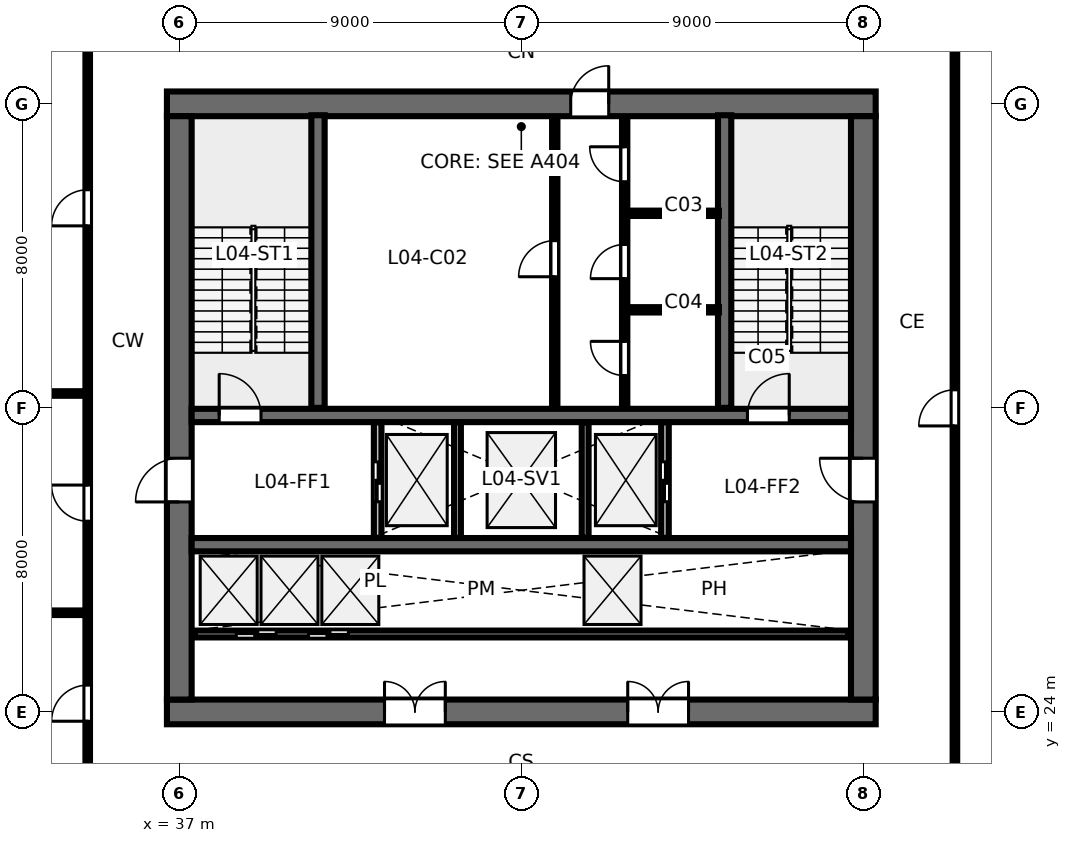
"""IFC4 building model, lengths in metres.
Left out: names, types, materials, properties, quantities, classifications, styles, units other than length and angle.
Written with IfcOpenShell. Run it as: python <this file> out.ifc"""

import sys

from ifc_helpers import new_model, si_unit, direction, frame, frame_2d, origin, place, context, subcontext, project, spatial, rectangle, extrude, element, fill, save


model = new_model("IFC4")
c1 = context("Model", 3, precision=1e-05, world=origin(), true_north=direction((0.0, 1.0)))
c2 = subcontext(c1, "Body", "Model", "MODEL_VIEW")
j1 = project(units=[si_unit("LENGTHUNIT", "METRE"), si_unit("PLANEANGLEUNIT", "RADIAN")], contexts=[c1])
p1 = place(None, origin())
s1 = spatial("IfcSite", under=j1, at=p1, CompositionType="ELEMENT")
p2 = place(p1, origin())
s2 = spatial("IfcBuilding", under=s1, at=p2, CompositionType="ELEMENT")
p3 = place(p2, frame((0.0, 0.0, 18.5)))
s3 = spatial("IfcBuildingStorey", under=s2, at=p3, CompositionType="ELEMENT", Elevation=18.5)
p4 = place(p3, frame((36.675, 24.0, 0.0), z_axis=(0.0, 0.0, 1.0), x_axis=(1.0, 0.0, 0.0)))
e1 = element("IfcWall", 1, at=p4, inside=s3, PredefinedType="SHEAR", context=c2, shape_type="SweptSolid", body=[
    extrude(rectangle(XDim=18.65, YDim=0.65, at=frame_2d((9.325, 0.0))), origin(), (0.0, 0.0, 1.0), 4.05),
])
p5 = place(p4, frame((5.725, 0.0, 0.0)))
e2 = element("IfcOpeningElement", 2, at=p5, cuts=e1, PredefinedType="OPENING", context=c2, shape_type="SweptSolid", body=[
    extrude(rectangle(XDim=1.6, YDim=2.15, at=frame_2d((0.8, 1.075))), frame((0.0, 0.335, 0.0), z_axis=(0.0, -1.0, 0.0), x_axis=(1.0, 0.0, 0.0)), (0.0, 0.0, 1.0), 0.67),
])
p6 = place(p4, frame((12.125, 0.0, 0.0)))
e3 = element("IfcOpeningElement", 3, at=p6, cuts=e1, PredefinedType="OPENING", context=c2, shape_type="SweptSolid", body=[
    extrude(rectangle(XDim=1.6, YDim=2.15, at=frame_2d((0.8, 1.075))), frame((0.0, 0.335, 0.0), z_axis=(0.0, -1.0, 0.0), x_axis=(1.0, 0.0, 0.0)), (0.0, 0.0, 1.0), 0.67),
])
p7 = place(p3, frame((36.675, 40.0, 0.0), z_axis=(0.0, 0.0, 1.0), x_axis=(1.0, 0.0, 0.0)))
e4 = element("IfcWall", 4, at=p7, inside=s3, PredefinedType="SHEAR", context=c2, shape_type="SweptSolid", body=[
    extrude(rectangle(XDim=18.65, YDim=0.65, at=frame_2d((9.325, 0.0))), origin(), (0.0, 0.0, 1.0), 4.05),
])
p8 = place(p7, frame((10.625, 0.0, 0.0)))
e5 = element("IfcOpeningElement", 5, at=p8, cuts=e4, PredefinedType="OPENING", context=c2, shape_type="SweptSolid", body=[
    extrude(rectangle(XDim=1.0, YDim=2.15, at=frame_2d((0.5, 1.075))), frame((0.0, 0.335, 0.0), z_axis=(0.0, -1.0, 0.0), x_axis=(1.0, 0.0, 0.0)), (0.0, 0.0, 1.0), 0.67),
])
p9 = place(p3, frame((37.0, 24.325, 0.0), z_axis=(0.0, 0.0, 1.0), x_axis=(0.0, 1.0, 0.0)))
e6 = element("IfcWall", 6, at=p9, inside=s3, PredefinedType="SHEAR", context=c2, shape_type="SweptSolid", body=[
    extrude(rectangle(XDim=15.35, YDim=0.65, at=frame_2d((7.675, 0.0))), origin(), (0.0, 0.0, 1.0), 4.05),
])
p10 = place(p9, frame((5.2, 0.0, 0.0)))
e7 = element("IfcOpeningElement", 7, at=p10, cuts=e6, PredefinedType="OPENING", context=c2, shape_type="SweptSolid", body=[
    extrude(rectangle(XDim=1.15, YDim=2.15, at=frame_2d((0.575, 1.075))), frame((0.0, 0.335, 0.0), z_axis=(0.0, -1.0, 0.0), x_axis=(1.0, 0.0, 0.0)), (0.0, 0.0, 1.0), 0.67),
])
p11 = place(p3, frame((55.0, 24.325, 0.0), z_axis=(0.0, 0.0, 1.0), x_axis=(0.0, 1.0, 0.0)))
e8 = element("IfcWall", 8, at=p11, inside=s3, PredefinedType="SHEAR", context=c2, shape_type="SweptSolid", body=[
    extrude(rectangle(XDim=15.35, YDim=0.65, at=frame_2d((7.675, 0.0))), origin(), (0.0, 0.0, 1.0), 4.05),
])
p12 = place(p11, frame((5.2, 0.0, 0.0)))
e9 = element("IfcOpeningElement", 9, at=p12, cuts=e8, PredefinedType="OPENING", context=c2, shape_type="SweptSolid", body=[
    extrude(rectangle(XDim=1.15, YDim=2.15, at=frame_2d((0.575, 1.075))), frame((0.0, 0.335, 0.0), z_axis=(0.0, -1.0, 0.0), x_axis=(1.0, 0.0, 0.0)), (0.0, 0.0, 1.0), 0.67),
])
p13 = place(p3, frame((37.325, 31.8, 0.0), z_axis=(0.0, 0.0, 1.0), x_axis=(1.0, 0.0, 0.0)))
e10 = element("IfcWall", 10, at=p13, inside=s3, PredefinedType="SHEAR", context=c2, shape_type="SweptSolid", body=[
    extrude(rectangle(XDim=17.35, YDim=0.35, at=frame_2d((8.675, 0.0))), origin(), (0.0, 0.0, 1.0), 4.05),
])
p14 = place(p13, frame((0.725, 0.0, 0.0)))
e11 = element("IfcOpeningElement", 11, at=p14, cuts=e10, PredefinedType="OPENING", context=c2, shape_type="SweptSolid", body=[
    extrude(rectangle(XDim=1.1, YDim=2.15, at=frame_2d((0.55, 1.075))), frame((0.0, 0.185, 0.0), z_axis=(0.0, -1.0, 0.0), x_axis=(1.0, 0.0, 0.0)), (0.0, 0.0, 1.0), 0.37),
])
p15 = place(p13, frame((14.625, 0.0, 0.0)))
e12 = element("IfcOpeningElement", 12, at=p15, cuts=e10, PredefinedType="OPENING", context=c2, shape_type="SweptSolid", body=[
    extrude(rectangle(XDim=1.1, YDim=2.15, at=frame_2d((0.55, 1.075))), frame((0.0, 0.185, 0.0), z_axis=(0.0, -1.0, 0.0), x_axis=(1.0, 0.0, 0.0)), (0.0, 0.0, 1.0), 0.37),
])
p16 = place(p3, frame((37.325, 28.4, 0.0), z_axis=(0.0, 0.0, 1.0), x_axis=(1.0, 0.0, 0.0)))
e13 = element("IfcWall", 13, at=p16, inside=s3, PredefinedType="SHEAR", context=c2, shape_type="SweptSolid", body=[
    extrude(rectangle(XDim=17.35, YDim=0.35, at=frame_2d((8.675, 0.0))), origin(), (0.0, 0.0, 1.0), 4.05),
])
for number, where, z_axis, x_axis in (
    (14, (40.65, 32.0, 0.0), (0.0, 0.0, 1.0), (0.0, 1.0, 0.0)),
    (15, (51.35, 32.0, 0.0), (0.0, 0.0, 1.0), (0.0, 1.0, 0.0)),
):
    element("IfcWall", number, at=place(p3, frame(where, z_axis=z_axis, x_axis=x_axis)), inside=s3, PredefinedType="SHEAR", context=c2, shape_type="SweptSolid", body=[
        extrude(rectangle(XDim=7.7, YDim=0.35, at=frame_2d((3.85, 0.0))), origin(), (0.0, 0.0, 1.0), 4.5),
    ])
p17 = place(p3, frame((46.88, 32.05, 0.0), z_axis=(0.0, 0.0, 1.0), x_axis=(0.0, 1.0, 0.0)))
e16 = element("IfcWall", 16, at=p17, inside=s3, PredefinedType="PARTITIONING", context=c2, shape_type="SweptSolid", body=[
    extrude(rectangle(XDim=7.6, YDim=0.14, at=frame_2d((3.8, 0.0))), origin(), (0.0, 0.0, 1.0), 4.05),
])
p18 = place(p17, frame((3.4, 0.0, 0.0)))
e17 = element("IfcOpeningElement", 17, at=p18, cuts=e16, PredefinedType="OPENING", context=c2, shape_type="SweptSolid", body=[
    extrude(rectangle(XDim=0.95, YDim=2.15, at=frame_2d((0.475, 1.075))), frame((0.0, 0.08, 0.0), z_axis=(0.0, -1.0, 0.0), x_axis=(1.0, 0.0, 0.0)), (0.0, 0.0, 1.0), 0.16),
])
p19 = place(p3, frame((48.72, 32.05, 0.0), z_axis=(0.0, 0.0, 1.0), x_axis=(0.0, 1.0, 0.0)))
e18 = element("IfcWall", 18, at=p19, inside=s3, PredefinedType="PARTITIONING", context=c2, shape_type="SweptSolid", body=[
    extrude(rectangle(XDim=7.6, YDim=0.14, at=frame_2d((3.8, 0.0))), origin(), (0.0, 0.0, 1.0), 4.05),
])
p20 = place(p19, frame((0.8, 0.0, 0.0)))
e19 = element("IfcOpeningElement", 19, at=p20, cuts=e18, PredefinedType="OPENING", context=c2, shape_type="SweptSolid", body=[
    extrude(rectangle(XDim=0.9, YDim=2.15, at=frame_2d((0.45, 1.075))), frame((0.0, 0.08, 0.0), z_axis=(0.0, -1.0, 0.0), x_axis=(1.0, 0.0, 0.0)), (0.0, 0.0, 1.0), 0.16),
])
p21 = place(p19, frame((3.35, 0.0, 0.0)))
e20 = element("IfcOpeningElement", 20, at=p21, cuts=e18, PredefinedType="OPENING", context=c2, shape_type="SweptSolid", body=[
    extrude(rectangle(XDim=0.9, YDim=2.15, at=frame_2d((0.45, 1.075))), frame((0.0, 0.08, 0.0), z_axis=(0.0, -1.0, 0.0), x_axis=(1.0, 0.0, 0.0)), (0.0, 0.0, 1.0), 0.16),
])
p22 = place(p19, frame((5.9, 0.0, 0.0)))
e21 = element("IfcOpeningElement", 21, at=p22, cuts=e18, PredefinedType="OPENING", context=c2, shape_type="SweptSolid", body=[
    extrude(rectangle(XDim=0.92, YDim=2.15, at=frame_2d((0.46, 1.075))), frame((0.0, 0.08, 0.0), z_axis=(0.0, -1.0, 0.0), x_axis=(1.0, 0.0, 0.0)), (0.0, 0.0, 1.0), 0.16),
])
for number, where, z_axis, x_axis in (
    (22, (48.8, 34.58, 0.0), (0.0, 0.0, 1.0), (1.0, 0.0, 0.0)),
    (23, (48.8, 37.12, 0.0), (0.0, 0.0, 1.0), (1.0, 0.0, 0.0)),
):
    element("IfcWall", number, at=place(p3, frame(where, z_axis=z_axis, x_axis=x_axis)), inside=s3, PredefinedType="PARTITIONING", context=c2, shape_type="SweptSolid", body=[
        extrude(rectangle(XDim=2.4, YDim=0.14, at=frame_2d((1.2, 0.0))), origin(), (0.0, 0.0, 1.0), 4.05),
    ])
p23 = place(p3, frame((42.22, 28.58, 0.0), z_axis=(0.0, 0.0, 1.0), x_axis=(0.0, 1.0, 0.0)))
e24 = element("IfcWall", 24, at=p23, inside=s3, PredefinedType="PARTITIONING", context=c2, shape_type="SweptSolid", body=[
    extrude(rectangle(XDim=3.04, YDim=0.2, at=frame_2d((1.52, 0.0))), origin(), (0.0, 0.0, 1.0), 4.05),
])
p24 = place(p23, frame((0.95, 0.0, 0.0)))
e25 = element("IfcOpeningElement", 25, at=p24, cuts=e24, PredefinedType="OPENING", context=c2, shape_type="SweptSolid", body=[
    extrude(rectangle(XDim=1.05, YDim=2.15, at=frame_2d((0.525, 1.075))), frame((0.0, 0.11, 0.0), z_axis=(0.0, -1.0, 0.0), x_axis=(1.0, 0.0, 0.0)), (0.0, 0.0, 1.0), 0.22),
])
p25 = place(p3, frame((49.78, 28.58, 0.0), z_axis=(0.0, 0.0, 1.0), x_axis=(0.0, 1.0, 0.0)))
e26 = element("IfcWall", 26, at=p25, inside=s3, PredefinedType="PARTITIONING", context=c2, shape_type="SweptSolid", body=[
    extrude(rectangle(XDim=3.04, YDim=0.2, at=frame_2d((1.52, 0.0))), origin(), (0.0, 0.0, 1.0), 4.05),
])
p26 = place(p25, frame((0.95, 0.0, 0.0)))
e27 = element("IfcOpeningElement", 27, at=p26, cuts=e26, PredefinedType="OPENING", context=c2, shape_type="SweptSolid", body=[
    extrude(rectangle(XDim=1.05, YDim=2.15, at=frame_2d((0.525, 1.075))), frame((0.0, 0.11, 0.0), z_axis=(0.0, -1.0, 0.0), x_axis=(1.0, 0.0, 0.0)), (0.0, 0.0, 1.0), 0.22),
])
for number, where, z_axis, x_axis in (
    (28, (44.32, 28.58, 0.0), (0.0, 0.0, 1.0), (0.0, 1.0, 0.0)),
    (29, (47.68, 28.58, 0.0), (0.0, 0.0, 1.0), (0.0, 1.0, 0.0)),
):
    element("IfcWall", number, at=place(p3, frame(where, z_axis=z_axis, x_axis=x_axis)), inside=s3, PredefinedType="PARTITIONING", context=c2, shape_type="SweptSolid", body=[
        extrude(rectangle(XDim=3.04, YDim=0.18, at=frame_2d((1.52, 0.0))), origin(), (0.0, 0.0, 1.0), 4.05),
    ])
p27 = place(p3, frame((37.4, 26.05, 0.0), z_axis=(0.0, 0.0, 1.0), x_axis=(1.0, 0.0, 0.0)))
e30 = element("IfcWall", 30, at=p27, inside=s3, PredefinedType="PARTITIONING", context=c2, shape_type="SweptSolid", body=[
    extrude(rectangle(XDim=17.2, YDim=0.18, at=frame_2d((8.6, 0.0))), origin(), (0.0, 0.0, 1.0), 4.05),
])
p28 = place(p27, frame((1.1, 0.0, 0.0)))
e31 = element("IfcOpeningElement", 31, at=p28, cuts=e30, PredefinedType="OPENING", context=c2, shape_type="SweptSolid", body=[
    extrude(rectangle(XDim=1.05, YDim=2.15, at=frame_2d((0.525, 1.075))), frame((0.0, 0.1, 0.0), z_axis=(0.0, -1.0, 0.0), x_axis=(1.0, 0.0, 0.0)), (0.0, 0.0, 1.0), 0.2),
])
p29 = place(p27, frame((3.0, 0.0, 0.0)))
e32 = element("IfcOpeningElement", 32, at=p29, cuts=e30, PredefinedType="OPENING", context=c2, shape_type="SweptSolid", body=[
    extrude(rectangle(XDim=1.05, YDim=2.15, at=frame_2d((0.525, 1.075))), frame((0.0, 0.1, 0.0), z_axis=(0.0, -1.0, 0.0), x_axis=(1.0, 0.0, 0.0)), (0.0, 0.0, 1.0), 0.2),
])
p30 = place(p3, frame((34.59, 26.61, 0.0), z_axis=(0.0, 0.0, 1.0), x_axis=(-1.0, 0.0, 0.0)))
e33 = element("IfcWall", 33, at=p30, inside=s3, PredefinedType="PARTITIONING", context=c2, shape_type="SweptSolid", body=[
    extrude(rectangle(XDim=18.65, YDim=0.12, at=frame_2d((9.325, 0.0))), origin(), (0.0, 0.0, 1.0), 2.89),
])
p31 = place(p30, frame((1.4, 0.0, 0.0)))
e34 = element("IfcOpeningElement", 34, at=p31, cuts=e33, PredefinedType="OPENING", context=c2, shape_type="SweptSolid", body=[
    extrude(rectangle(XDim=0.9, YDim=2.15, at=frame_2d((0.45, 1.075))), frame((0.0, 0.07, 0.0), z_axis=(0.0, -1.0, 0.0), x_axis=(1.0, 0.0, 0.0)), (0.0, 0.0, 1.0), 0.14),
])
p32 = place(p3, frame((34.59, 32.378, 0.0), z_axis=(0.0, 0.0, 1.0), x_axis=(-1.0, 0.0, 0.0)))
e35 = element("IfcWall", 35, at=p32, inside=s3, PredefinedType="PARTITIONING", context=c2, shape_type="SweptSolid", body=[
    extrude(rectangle(XDim=6.24, YDim=0.12, at=frame_2d((3.12, 0.0))), origin(), (0.0, 0.0, 1.0), 2.89),
])
p33 = place(p32, frame((1.4, 0.0, 0.0)))
e36 = element("IfcOpeningElement", 36, at=p33, cuts=e35, PredefinedType="OPENING", context=c2, shape_type="SweptSolid", body=[
    extrude(rectangle(XDim=0.9, YDim=2.15, at=frame_2d((0.45, 1.075))), frame((0.0, 0.07, 0.0), z_axis=(0.0, -1.0, 0.0), x_axis=(1.0, 0.0, 0.0)), (0.0, 0.0, 1.0), 0.14),
])
p34 = place(p3, frame((34.59, 21.65, 0.0), z_axis=(0.0, 0.0, 1.0), x_axis=(0.0, 1.0, 0.0)))
e37 = element("IfcWall", 37, at=p34, inside=s3, PredefinedType="PARTITIONING", context=c2, shape_type="SweptSolid", body=[
    extrude(rectangle(XDim=20.7, YDim=0.12, at=frame_2d((10.35, 0.0))), origin(), (0.0, 0.0, 1.0), 2.89),
])
p35 = place(p34, frame((2.105, 0.0, 0.0)))
e38 = element("IfcOpeningElement", 38, at=p35, cuts=e37, PredefinedType="OPENING", context=c2, shape_type="SweptSolid", body=[
    extrude(rectangle(XDim=0.95, YDim=2.15, at=frame_2d((0.475, 1.075))), frame((0.0, 0.07, 0.0), z_axis=(0.0, -1.0, 0.0), x_axis=(1.0, 0.0, 0.0)), (0.0, 0.0, 1.0), 0.14),
])
p36 = place(p34, frame((7.369, 0.0, 0.0)))
e39 = element("IfcOpeningElement", 39, at=p36, cuts=e37, PredefinedType="OPENING", context=c2, shape_type="SweptSolid", body=[
    extrude(rectangle(XDim=0.95, YDim=2.15, at=frame_2d((0.475, 1.075))), frame((0.0, 0.07, 0.0), z_axis=(0.0, -1.0, 0.0), x_axis=(1.0, 0.0, 0.0)), (0.0, 0.0, 1.0), 0.14),
])
p37 = place(p34, frame((15.139, 0.0, 0.0)))
e40 = element("IfcOpeningElement", 40, at=p37, cuts=e37, PredefinedType="OPENING", context=c2, shape_type="SweptSolid", body=[
    extrude(rectangle(XDim=0.95, YDim=2.15, at=frame_2d((0.475, 1.075))), frame((0.0, 0.07, 0.0), z_axis=(0.0, -1.0, 0.0), x_axis=(1.0, 0.0, 0.0)), (0.0, 0.0, 1.0), 0.14),
])
p38 = place(p3, frame((57.41, 21.65, 0.0), z_axis=(0.0, 0.0, 1.0), x_axis=(0.0, 1.0, 0.0)))
e41 = element("IfcWall", 41, at=p38, inside=s3, PredefinedType="PARTITIONING", context=c2, shape_type="SweptSolid", body=[
    extrude(rectangle(XDim=20.7, YDim=0.12, at=frame_2d((10.35, 0.0))), origin(), (0.0, 0.0, 1.0), 2.89),
])
p39 = place(p38, frame((9.875, 0.0, 0.0)))
e42 = element("IfcOpeningElement", 42, at=p39, cuts=e41, PredefinedType="OPENING", context=c2, shape_type="SweptSolid", body=[
    extrude(rectangle(XDim=0.95, YDim=2.15, at=frame_2d((0.475, 1.075))), frame((0.0, 0.07, 0.0), z_axis=(0.0, -1.0, 0.0), x_axis=(1.0, 0.0, 0.0)), (0.0, 0.0, 1.0), 0.14),
])
p40 = place(p14, origin())
e43 = element("IfcDoor", 43, at=p40, inside=s3, OperationType="SINGLE_SWING_LEFT", PredefinedType="DOOR", context=c2, shape_type="SweptSolid", body=[
    extrude(rectangle(XDim=1.1, YDim=2.15, at=frame_2d((0.55, 1.075))), frame((0.0, 0.025, 0.0), z_axis=(0.0, -1.0, 0.0), x_axis=(1.0, 0.0, 0.0)), (0.0, 0.0, 1.0), 0.05),
])
fill(e11, e43)
p41 = place(p15, origin())
e44 = element("IfcDoor", 44, at=p41, inside=s3, OperationType="SINGLE_SWING_RIGHT", PredefinedType="DOOR", context=c2, shape_type="SweptSolid", body=[
    extrude(rectangle(XDim=1.1, YDim=2.15, at=frame_2d((0.55, 1.075))), frame((0.0, 0.025, 0.0), z_axis=(0.0, -1.0, 0.0), x_axis=(1.0, 0.0, 0.0)), (0.0, 0.0, 1.0), 0.05),
])
fill(e12, e44)
p42 = place(p8, origin())
e45 = element("IfcDoor", 45, at=p42, inside=s3, OperationType="SINGLE_SWING_RIGHT", PredefinedType="DOOR", context=c2, shape_type="SweptSolid", body=[
    extrude(rectangle(XDim=1.0, YDim=2.15, at=frame_2d((0.5, 1.075))), frame((0.0, 0.025, 0.0), z_axis=(0.0, -1.0, 0.0), x_axis=(1.0, 0.0, 0.0)), (0.0, 0.0, 1.0), 0.05),
])
fill(e5, e45)
p43 = place(p10, origin())
e46 = element("IfcDoor", 46, at=p43, inside=s3, OperationType="SINGLE_SWING_LEFT", PredefinedType="DOOR", context=c2, shape_type="SweptSolid", body=[
    extrude(rectangle(XDim=1.15, YDim=2.15, at=frame_2d((0.575, 1.075))), frame((0.0, 0.025, 0.0), z_axis=(0.0, -1.0, 0.0), x_axis=(1.0, 0.0, 0.0)), (0.0, 0.0, 1.0), 0.05),
])
fill(e7, e46)
p44 = place(p12, origin())
e47 = element("IfcDoor", 47, at=p44, inside=s3, OperationType="SINGLE_SWING_RIGHT", PredefinedType="DOOR", context=c2, shape_type="SweptSolid", body=[
    extrude(rectangle(XDim=1.15, YDim=2.15, at=frame_2d((0.575, 1.075))), frame((0.0, 0.025, 0.0), z_axis=(0.0, -1.0, 0.0), x_axis=(1.0, 0.0, 0.0)), (0.0, 0.0, 1.0), 0.05),
])
fill(e9, e47)
p45 = place(p5, origin())
e48 = element("IfcDoor", 48, at=p45, inside=s3, OperationType="DOUBLE_DOOR_SINGLE_SWING", PredefinedType="DOOR", context=c2, shape_type="SweptSolid", body=[
    extrude(rectangle(XDim=1.6, YDim=2.15, at=frame_2d((0.8, 1.075))), frame((0.0, 0.025, 0.0), z_axis=(0.0, -1.0, 0.0), x_axis=(1.0, 0.0, 0.0)), (0.0, 0.0, 1.0), 0.05),
])
fill(e2, e48)
p46 = place(p6, origin())
e49 = element("IfcDoor", 49, at=p46, inside=s3, OperationType="DOUBLE_DOOR_SINGLE_SWING", PredefinedType="DOOR", context=c2, shape_type="SweptSolid", body=[
    extrude(rectangle(XDim=1.6, YDim=2.15, at=frame_2d((0.8, 1.075))), frame((0.0, 0.025, 0.0), z_axis=(0.0, -1.0, 0.0), x_axis=(1.0, 0.0, 0.0)), (0.0, 0.0, 1.0), 0.05),
])
fill(e3, e49)
p47 = place(p18, origin())
e50 = element("IfcDoor", 50, at=p47, inside=s3, OperationType="SINGLE_SWING_LEFT", PredefinedType="DOOR", context=c2, shape_type="SweptSolid", body=[
    extrude(rectangle(XDim=0.95, YDim=2.15, at=frame_2d((0.475, 1.075))), frame((0.0, 0.025, 0.0), z_axis=(0.0, -1.0, 0.0), x_axis=(1.0, 0.0, 0.0)), (0.0, 0.0, 1.0), 0.05),
])
fill(e17, e50)
p48 = place(p20, origin())
e51 = element("IfcDoor", 51, at=p48, inside=s3, OperationType="SINGLE_SWING_RIGHT", PredefinedType="DOOR", context=c2, shape_type="SweptSolid", body=[
    extrude(rectangle(XDim=0.9, YDim=2.15, at=frame_2d((0.45, 1.075))), frame((0.0, 0.025, 0.0), z_axis=(0.0, -1.0, 0.0), x_axis=(1.0, 0.0, 0.0)), (0.0, 0.0, 1.0), 0.05),
])
fill(e19, e51)
p49 = place(p21, origin())
e52 = element("IfcDoor", 52, at=p49, inside=s3, OperationType="SINGLE_SWING_LEFT", PredefinedType="DOOR", context=c2, shape_type="SweptSolid", body=[
    extrude(rectangle(XDim=0.9, YDim=2.15, at=frame_2d((0.45, 1.075))), frame((0.0, 0.025, 0.0), z_axis=(0.0, -1.0, 0.0), x_axis=(1.0, 0.0, 0.0)), (0.0, 0.0, 1.0), 0.05),
])
fill(e20, e52)
p50 = place(p22, origin())
e53 = element("IfcDoor", 53, at=p50, inside=s3, OperationType="SINGLE_SWING_RIGHT", PredefinedType="DOOR", context=c2, shape_type="SweptSolid", body=[
    extrude(rectangle(XDim=0.92, YDim=2.15, at=frame_2d((0.46, 1.075))), frame((0.0, 0.025, 0.0), z_axis=(0.0, -1.0, 0.0), x_axis=(1.0, 0.0, 0.0)), (0.0, 0.0, 1.0), 0.05),
])
fill(e21, e53)
p51 = place(p24, origin())
e54 = element("IfcDoor", 54, at=p51, inside=s3, OperationType="SLIDING_TO_LEFT", PredefinedType="DOOR", context=c2, shape_type="SweptSolid", body=[
    extrude(rectangle(XDim=1.05, YDim=2.15, at=frame_2d((0.525, 1.075))), frame((0.0, 0.025, 0.0), z_axis=(0.0, -1.0, 0.0), x_axis=(1.0, 0.0, 0.0)), (0.0, 0.0, 1.0), 0.05),
])
fill(e25, e54)
p52 = place(p26, origin())
e55 = element("IfcDoor", 55, at=p52, inside=s3, OperationType="SLIDING_TO_RIGHT", PredefinedType="DOOR", context=c2, shape_type="SweptSolid", body=[
    extrude(rectangle(XDim=1.05, YDim=2.15, at=frame_2d((0.525, 1.075))), frame((0.0, 0.025, 0.0), z_axis=(0.0, -1.0, 0.0), x_axis=(1.0, 0.0, 0.0)), (0.0, 0.0, 1.0), 0.05),
])
fill(e27, e55)
p53 = place(p28, origin())
e56 = element("IfcDoor", 56, at=p53, inside=s3, OperationType="SLIDING_TO_LEFT", PredefinedType="DOOR", context=c2, shape_type="SweptSolid", body=[
    extrude(rectangle(XDim=1.05, YDim=2.15, at=frame_2d((0.525, 1.075))), frame((0.0, 0.025, 0.0), z_axis=(0.0, -1.0, 0.0), x_axis=(1.0, 0.0, 0.0)), (0.0, 0.0, 1.0), 0.05),
])
fill(e31, e56)
p54 = place(p29, origin())
e57 = element("IfcDoor", 57, at=p54, inside=s3, OperationType="SLIDING_TO_RIGHT", PredefinedType="DOOR", context=c2, shape_type="SweptSolid", body=[
    extrude(rectangle(XDim=1.05, YDim=2.15, at=frame_2d((0.525, 1.075))), frame((0.0, 0.025, 0.0), z_axis=(0.0, -1.0, 0.0), x_axis=(1.0, 0.0, 0.0)), (0.0, 0.0, 1.0), 0.05),
])
fill(e32, e57)
p55 = place(p35, origin())
e58 = element("IfcDoor", 58, at=p55, inside=s3, OperationType="SINGLE_SWING_LEFT", PredefinedType="DOOR", context=c2, shape_type="SweptSolid", body=[
    extrude(rectangle(XDim=0.95, YDim=2.15, at=frame_2d((0.475, 1.075))), frame((0.0, 0.025, 0.0), z_axis=(0.0, -1.0, 0.0), x_axis=(1.0, 0.0, 0.0)), (0.0, 0.0, 1.0), 0.05),
])
fill(e38, e58)
p56 = place(p36, origin())
e59 = element("IfcDoor", 59, at=p56, inside=s3, OperationType="SINGLE_SWING_RIGHT", PredefinedType="DOOR", context=c2, shape_type="SweptSolid", body=[
    extrude(rectangle(XDim=0.95, YDim=2.15, at=frame_2d((0.475, 1.075))), frame((0.0, 0.025, 0.0), z_axis=(0.0, -1.0, 0.0), x_axis=(1.0, 0.0, 0.0)), (0.0, 0.0, 1.0), 0.05),
])
fill(e39, e59)
p57 = place(p37, origin())
e60 = element("IfcDoor", 60, at=p57, inside=s3, OperationType="SINGLE_SWING_LEFT", PredefinedType="DOOR", context=c2, shape_type="SweptSolid", body=[
    extrude(rectangle(XDim=0.95, YDim=2.15, at=frame_2d((0.475, 1.075))), frame((0.0, 0.025, 0.0), z_axis=(0.0, -1.0, 0.0), x_axis=(1.0, 0.0, 0.0)), (0.0, 0.0, 1.0), 0.05),
])
fill(e40, e60)
p58 = place(p39, origin())
e61 = element("IfcDoor", 61, at=p58, inside=s3, OperationType="SINGLE_SWING_LEFT", PredefinedType="DOOR", context=c2, shape_type="SweptSolid", body=[
    extrude(rectangle(XDim=0.95, YDim=2.15, at=frame_2d((0.475, 1.075))), frame((0.0, 0.025, 0.0), z_axis=(0.0, -1.0, 0.0), x_axis=(1.0, 0.0, 0.0)), (0.0, 0.0, 1.0), 0.05),
])
fill(e42, e61)
save(model, sys.argv[1])
